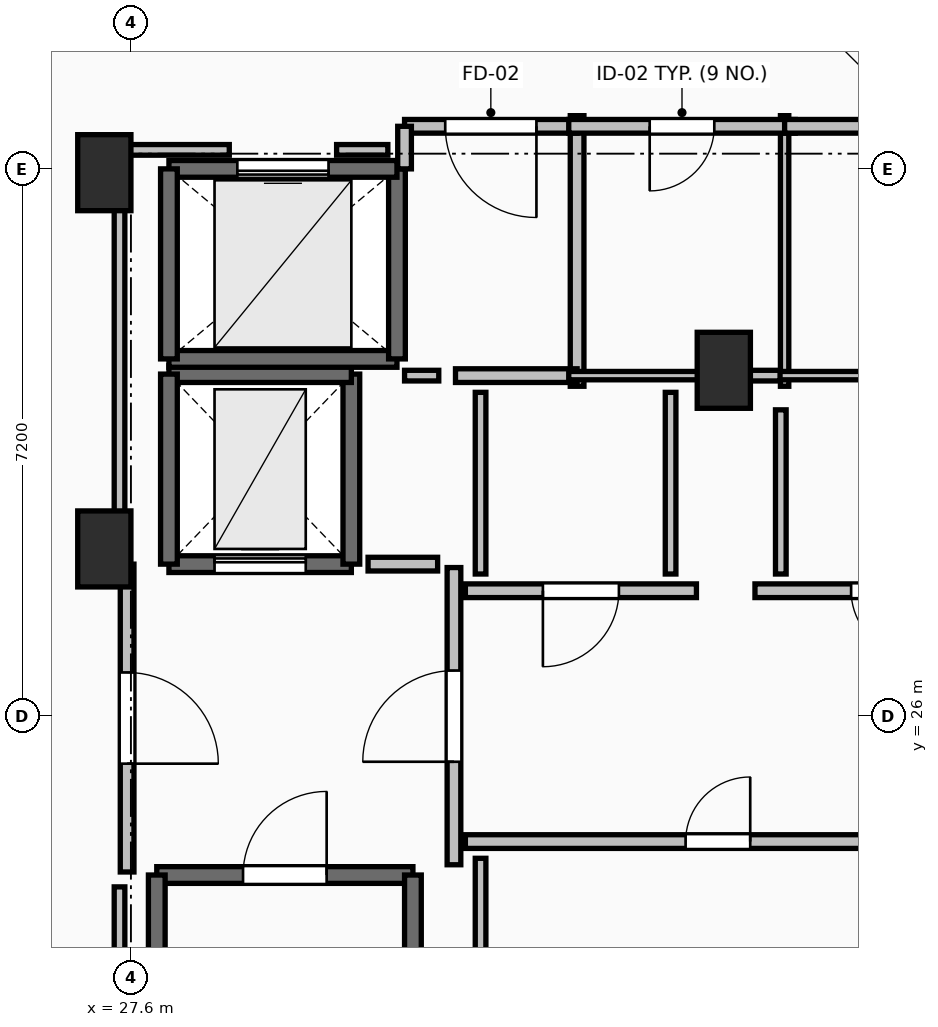
"""IFC4 building model, lengths in metres.
Left out: names, types, materials, properties, quantities, classifications, styles, units other than length and angle.
Written with IfcOpenShell. Run it as: python <this file> out.ifc"""

import sys

from ifc_helpers import new_model, si_unit, direction, frame, frame_2d, origin, origin_2d, place, context, subcontext, project, spatial, rectangle, extrude, element, fill, save


model = new_model("IFC4")
c1 = context("Model", 3, precision=1e-05, world=origin(), true_north=direction((0.0, 1.0)))
c2 = subcontext(c1, "Body", "Model", "MODEL_VIEW")
j1 = project(units=[si_unit("LENGTHUNIT", "METRE"), si_unit("PLANEANGLEUNIT", "RADIAN")], contexts=[c1])
p1 = place(None, origin())
s1 = spatial("IfcSite", under=j1, at=p1, CompositionType="ELEMENT")
p2 = place(p1, origin())
s2 = spatial("IfcBuilding", under=s1, at=p2, CompositionType="ELEMENT")
p3 = place(p2, frame((0.0, 0.0, 290.4)))
s3 = spatial("IfcBuildingStorey", under=s2, at=p3, CompositionType="ELEMENT", Elevation=290.4)
for number, where, z_axis, x_axis in (
    (1, (27.25, 28.2, 0.0), (0.0, 0.0, 1.0), (1.0, 0.0, 0.0)),
    (2, (27.25, 33.15, 0.0), (0.0, 0.0, 1.0), (1.0, 0.0, 0.0)),
    (3, (35.4, 30.55, 0.0), (0.0, 0.0, 1.0), (1.0, 0.0, 0.0)),
):
    element("IfcColumn", number, at=place(p3, frame(where, z_axis=z_axis, x_axis=x_axis)), inside=s3, PredefinedType="PILASTER", context=c2, shape_type="SweptSolid", body=[
        extrude(rectangle(XDim=0.7, YDim=1.0, at=origin_2d()), origin(), (0.0, 0.0, 1.0), 5.0),
    ])
p4 = place(p3, frame((27.94, 23.91, 0.0), z_axis=(0.0, 0.0, 1.0), x_axis=(1.0, 0.0, 0.0)))
e4 = element("IfcWall", 4, at=p4, inside=s3, PredefinedType="SOLIDWALL", context=c2, shape_type="SweptSolid", body=[
    extrude(rectangle(XDim=3.37, YDim=0.22, at=frame_2d((1.685, 0.0))), origin(), (0.0, 0.0, 1.0), 4.72),
])
p5 = place(p4, frame((1.135, 0.0, 0.0)))
e5 = element("IfcOpeningElement", 5, at=p5, cuts=e4, PredefinedType="OPENING", context=c2, shape_type="SweptSolid", body=[
    extrude(rectangle(XDim=1.1, YDim=2.15, at=frame_2d((0.55, 1.075))), frame((0.0, 0.125, 0.0), z_axis=(0.0, -1.0, 0.0), x_axis=(1.0, 0.0, 0.0)), (0.0, 0.0, 1.0), 0.25),
])
for number, where, z_axis, x_axis in (
    (6, (31.31, 23.91, 0.0), (0.0, 0.0, 1.0), (0.0, -1.0, 0.0)),
    (7, (27.94, 16.49, 0.0), (0.0, 0.0, 1.0), (0.0, 1.0, 0.0)),
):
    element("IfcWall", number, at=place(p3, frame(where, z_axis=z_axis, x_axis=x_axis)), inside=s3, PredefinedType="SOLIDWALL", context=c2, shape_type="SweptSolid", body=[
        extrude(rectangle(XDim=7.42, YDim=0.22, at=frame_2d((3.71, 0.0))), origin(), (0.0, 0.0, 1.0), 4.72),
    ])
p6 = place(p3, frame((28.1, 28.0, 0.0), z_axis=(0.0, 0.0, 1.0), x_axis=(1.0, 0.0, 0.0)))
e8 = element("IfcWall", 8, at=p6, inside=s3, PredefinedType="SHEAR", context=c2, shape_type="SweptSolid", body=[
    extrude(rectangle(XDim=2.4, YDim=0.22, at=frame_2d((1.2, 0.0))), origin(), (0.0, 0.0, 1.0), 4.72),
])
p7 = place(p6, frame((0.6, 0.0, 0.0)))
e9 = element("IfcOpeningElement", 9, at=p7, cuts=e8, PredefinedType="OPENING", context=c2, shape_type="SweptSolid", body=[
    extrude(rectangle(XDim=1.2, YDim=2.2, at=frame_2d((0.6, 1.1))), frame((0.0, 0.125, 0.0), z_axis=(0.0, -1.0, 0.0), x_axis=(1.0, 0.0, 0.0)), (0.0, 0.0, 1.0), 0.25),
])
p8 = place(p3, frame((30.5, 28.0, 0.0), z_axis=(0.0, 0.0, 1.0), x_axis=(0.0, 1.0, 0.0)))
e10 = element("IfcWall", 10, at=p8, inside=s3, PredefinedType="SHEAR", context=c2, shape_type="SweptSolid", body=[
    extrude(rectangle(XDim=2.5, YDim=0.22, at=frame_2d((1.25, 0.0))), origin(), (0.0, 0.0, 1.0), 4.72),
])
p9 = place(p3, frame((30.5, 30.5, 0.0), z_axis=(0.0, 0.0, 1.0), x_axis=(-1.0, 0.0, 0.0)))
e11 = element("IfcWall", 11, at=p9, inside=s3, PredefinedType="SHEAR", context=c2, shape_type="SweptSolid", body=[
    extrude(rectangle(XDim=2.4, YDim=0.22, at=frame_2d((1.2, 0.0))), origin(), (0.0, 0.0, 1.0), 4.72),
])
p10 = place(p3, frame((28.1, 30.5, 0.0), z_axis=(0.0, 0.0, 1.0), x_axis=(0.0, -1.0, 0.0)))
e12 = element("IfcWall", 12, at=p10, inside=s3, PredefinedType="SHEAR", context=c2, shape_type="SweptSolid", body=[
    extrude(rectangle(XDim=2.5, YDim=0.22, at=frame_2d((1.25, 0.0))), origin(), (0.0, 0.0, 1.0), 4.72),
])
p11 = place(p3, frame((28.1, 30.7, 0.0), z_axis=(0.0, 0.0, 1.0), x_axis=(1.0, 0.0, 0.0)))
e13 = element("IfcWall", 13, at=p11, inside=s3, PredefinedType="SOLIDWALL", context=c2, shape_type="SweptSolid", body=[
    extrude(rectangle(XDim=3.0, YDim=0.22, at=frame_2d((1.5, 0.0))), origin(), (0.0, 0.0, 1.0), 4.72),
])
p12 = place(p3, frame((31.1, 30.7, 0.0), z_axis=(0.0, 0.0, 1.0), x_axis=(0.0, 1.0, 0.0)))
e14 = element("IfcWall", 14, at=p12, inside=s3, PredefinedType="SOLIDWALL", context=c2, shape_type="SweptSolid", body=[
    extrude(rectangle(XDim=2.5, YDim=0.22, at=frame_2d((1.25, 0.0))), origin(), (0.0, 0.0, 1.0), 4.72),
])
p13 = place(p3, frame((31.1, 33.2, 0.0), z_axis=(0.0, 0.0, 1.0), x_axis=(-1.0, 0.0, 0.0)))
e15 = element("IfcWall", 15, at=p13, inside=s3, PredefinedType="SOLIDWALL", context=c2, shape_type="SweptSolid", body=[
    extrude(rectangle(XDim=3.0, YDim=0.22, at=frame_2d((1.5, 0.0))), origin(), (0.0, 0.0, 1.0), 4.72),
])
p14 = place(p13, frame((0.9, 0.0, 0.0)))
e16 = element("IfcOpeningElement", 16, at=p14, cuts=e15, PredefinedType="OPENING", context=c2, shape_type="SweptSolid", body=[
    extrude(rectangle(XDim=1.2, YDim=2.2, at=frame_2d((0.6, 1.1))), frame((0.0, 0.125, 0.0), z_axis=(0.0, -1.0, 0.0), x_axis=(1.0, 0.0, 0.0)), (0.0, 0.0, 1.0), 0.25),
])
p15 = place(p3, frame((28.1, 33.2, 0.0), z_axis=(0.0, 0.0, 1.0), x_axis=(0.0, -1.0, 0.0)))
e17 = element("IfcWall", 17, at=p15, inside=s3, PredefinedType="SOLIDWALL", context=c2, shape_type="SweptSolid", body=[
    extrude(rectangle(XDim=2.5, YDim=0.22, at=frame_2d((1.25, 0.0))), origin(), (0.0, 0.0, 1.0), 4.72),
])
p16 = place(p3, frame((31.85, 24.045, 0.0), z_axis=(0.0, 0.0, 1.0), x_axis=(0.0, 1.0, 0.0)))
e18 = element("IfcWall", 18, at=p16, inside=s3, PredefinedType="PARTITIONING", context=c2, shape_type="SweptSolid", body=[
    extrude(rectangle(XDim=3.91, YDim=0.18, at=frame_2d((1.955, 0.0))), origin(), (0.0, 0.0, 1.0), 4.72),
])
p17 = place(p16, frame((1.355, 0.0, 0.0)))
e19 = element("IfcOpeningElement", 19, at=p17, cuts=e18, PredefinedType="OPENING", context=c2, shape_type="SweptSolid", body=[
    extrude(rectangle(XDim=1.2, YDim=2.15, at=frame_2d((0.6, 1.075))), frame((0.0, 0.105, 0.0), z_axis=(0.0, -1.0, 0.0), x_axis=(1.0, 0.0, 0.0)), (0.0, 0.0, 1.0), 0.21),
])
p18 = place(p3, frame((27.55, 28.0, 0.0), z_axis=(0.0, 0.0, 1.0), x_axis=(0.0, -1.0, 0.0)))
e20 = element("IfcWall", 20, at=p18, inside=s3, PredefinedType="PARTITIONING", context=c2, shape_type="SweptSolid", body=[
    extrude(rectangle(XDim=4.05, YDim=0.18, at=frame_2d((2.025, 0.0))), origin(), (0.0, 0.0, 1.0), 4.72),
])
p19 = place(p18, frame((1.425, 0.0, 0.0)))
e21 = element("IfcOpeningElement", 21, at=p19, cuts=e20, PredefinedType="OPENING", context=c2, shape_type="SweptSolid", body=[
    extrude(rectangle(XDim=1.2, YDim=2.15, at=frame_2d((0.6, 1.075))), frame((0.0, 0.105, 0.0), z_axis=(0.0, -1.0, 0.0), x_axis=(1.0, 0.0, 0.0)), (0.0, 0.0, 1.0), 0.21),
])
p20 = place(p3, frame((33.47, 30.34, 0.0), z_axis=(0.0, 0.0, 1.0), x_axis=(0.0, 1.0, 0.0)))
e22 = element("IfcWall", 22, at=p20, inside=s3, PredefinedType="PARTITIONING", context=c2, shape_type="SweptSolid", body=[
    extrude(rectangle(XDim=3.56, YDim=0.18, at=frame_2d((1.78, 0.0))), origin(), (0.0, 0.0, 1.0), 4.72),
])
p21 = place(p3, frame((31.87, 30.48, 0.0), z_axis=(0.0, 0.0, 1.0), x_axis=(1.0, 0.0, 0.0)))
e23 = element("IfcWall", 23, at=p21, inside=s3, PredefinedType="PARTITIONING", context=c2, shape_type="SweptSolid", body=[
    extrude(rectangle(XDim=1.6, YDim=0.18, at=frame_2d((0.8, 0.0))), origin(), (0.0, 0.0, 1.0), 4.72),
])
p22 = place(p3, frame((33.47, 33.76, 0.0), z_axis=(0.0, 0.0, 1.0), x_axis=(-1.0, 0.0, 0.0)))
e24 = element("IfcWall", 24, at=p22, inside=s3, PredefinedType="PARTITIONING", context=c2, shape_type="SweptSolid", body=[
    extrude(rectangle(XDim=2.27, YDim=0.18, at=frame_2d((1.135, 0.0))), origin(), (0.0, 0.0, 1.0), 4.72),
])
p23 = place(p22, frame((0.535, 0.0, 0.0)))
e25 = element("IfcOpeningElement", 25, at=p23, cuts=e24, PredefinedType="OPENING", context=c2, shape_type="SweptSolid", body=[
    extrude(rectangle(XDim=1.2, YDim=2.15, at=frame_2d((0.6, 1.075))), frame((0.0, 0.105, 0.0), z_axis=(0.0, -1.0, 0.0), x_axis=(1.0, 0.0, 0.0)), (0.0, 0.0, 1.0), 0.21),
])
p24 = place(p3, frame((31.2, 33.76, 0.0), z_axis=(0.0, 0.0, 1.0), x_axis=(0.0, -1.0, 0.0)))
e26 = element("IfcWall", 26, at=p24, inside=s3, PredefinedType="PARTITIONING", context=c2, shape_type="SweptSolid", body=[
    extrude(rectangle(XDim=0.56, YDim=0.18, at=frame_2d((0.28, 0.0))), origin(), (0.0, 0.0, 1.0), 4.72),
])
p25 = place(p3, frame((35.04, 27.65, 0.0), z_axis=(0.0, 0.0, 1.0), x_axis=(-1.0, 0.0, 0.0)))
e27 = element("IfcWall", 27, at=p25, inside=s3, PredefinedType="PARTITIONING", context=c2, shape_type="SweptSolid", body=[
    extrude(rectangle(XDim=3.04, YDim=0.18, at=frame_2d((1.52, 0.0))), origin(), (0.0, 0.0, 1.0), 4.72),
])
p26 = place(p25, frame((1.02, 0.0, 0.0)))
e28 = element("IfcOpeningElement", 28, at=p26, cuts=e27, PredefinedType="OPENING", context=c2, shape_type="SweptSolid", body=[
    extrude(rectangle(XDim=1.0, YDim=2.15, at=frame_2d((0.5, 1.075))), frame((0.0, 0.105, 0.0), z_axis=(0.0, -1.0, 0.0), x_axis=(1.0, 0.0, 0.0)), (0.0, 0.0, 1.0), 0.21),
])
p27 = place(p3, frame((39.19, 27.65, 0.0), z_axis=(0.0, 0.0, 1.0), x_axis=(-1.0, 0.0, 0.0)))
e29 = element("IfcWall", 29, at=p27, inside=s3, PredefinedType="PARTITIONING", context=c2, shape_type="SweptSolid", body=[
    extrude(rectangle(XDim=3.38, YDim=0.18, at=frame_2d((1.69, 0.0))), origin(), (0.0, 0.0, 1.0), 4.72),
])
p28 = place(p27, frame((1.265, 0.0, 0.0)))
e30 = element("IfcOpeningElement", 30, at=p28, cuts=e29, PredefinedType="OPENING", context=c2, shape_type="SweptSolid", body=[
    extrude(rectangle(XDim=0.85, YDim=2.1, at=frame_2d((0.425, 1.05))), frame((0.0, 0.105, 0.0), z_axis=(0.0, -1.0, 0.0), x_axis=(1.0, 0.0, 0.0)), (0.0, 0.0, 1.0), 0.21),
])
p29 = place(p3, frame((32.0, 24.35, 0.0), z_axis=(0.0, 0.0, 1.0), x_axis=(1.0, 0.0, 0.0)))
e31 = element("IfcWall", 31, at=p29, inside=s3, PredefinedType="PARTITIONING", context=c2, shape_type="SweptSolid", body=[
    extrude(rectangle(XDim=6.645, YDim=0.18, at=frame_2d((3.323, 0.0))), origin(), (0.0, 0.0, 1.0), 4.72),
])
p30 = place(p29, frame((2.897, 0.0, 0.0)))
e32 = element("IfcOpeningElement", 32, at=p30, cuts=e31, PredefinedType="OPENING", context=c2, shape_type="SweptSolid", body=[
    extrude(rectangle(XDim=0.85, YDim=2.1, at=frame_2d((0.425, 1.05))), frame((0.0, 0.105, 0.0), z_axis=(0.0, -1.0, 0.0), x_axis=(1.0, 0.0, 0.0)), (0.0, 0.0, 1.0), 0.21),
])
p31 = place(p3, frame((36.2, 30.34, 0.0), z_axis=(0.0, 0.0, 1.0), x_axis=(0.0, 1.0, 0.0)))
e33 = element("IfcWall", 33, at=p31, inside=s3, PredefinedType="PARTITIONING", context=c2, shape_type="SweptSolid", body=[
    extrude(rectangle(XDim=3.56, YDim=0.11, at=frame_2d((1.78, 0.0))), origin(), (0.0, 0.0, 1.0), 3.912),
])
p32 = place(p3, frame((33.36, 30.48, 0.0), z_axis=(0.0, 0.0, 1.0), x_axis=(1.0, 0.0, 0.0)))
e34 = element("IfcWall", 34, at=p32, inside=s3, PredefinedType="PARTITIONING", context=c2, shape_type="SweptSolid", body=[
    extrude(rectangle(XDim=1.81, YDim=0.11, at=frame_2d((0.905, 0.0))), origin(), (0.0, 0.0, 1.0), 4.72),
])
p33 = place(p3, frame((36.34, 33.76, 0.0), z_axis=(0.0, 0.0, 1.0), x_axis=(-1.0, 0.0, 0.0)))
e35 = element("IfcWall", 35, at=p33, inside=s3, PredefinedType="PARTITIONING", context=c2, shape_type="SweptSolid", body=[
    extrude(rectangle(XDim=2.98, YDim=0.18, at=frame_2d((1.49, 0.0))), origin(), (0.0, 0.0, 1.0), 4.72),
])
p34 = place(p33, frame((1.065, 0.0, 0.0)))
e36 = element("IfcOpeningElement", 36, at=p34, cuts=e35, PredefinedType="OPENING", context=c2, shape_type="SweptSolid", body=[
    extrude(rectangle(XDim=0.85, YDim=2.1, at=frame_2d((0.425, 1.05))), frame((0.0, 0.105, 0.0), z_axis=(0.0, -1.0, 0.0), x_axis=(1.0, 0.0, 0.0)), (0.0, 0.0, 1.0), 0.21),
])
p35 = place(p3, frame((36.11, 30.48, 0.0), z_axis=(0.0, 0.0, 1.0), x_axis=(1.0, 0.0, 0.0)))
e37 = element("IfcWall", 37, at=p35, inside=s3, PredefinedType="PARTITIONING", context=c2, shape_type="SweptSolid", body=[
    extrude(rectangle(XDim=3.21, YDim=0.11, at=frame_2d((1.605, 0.0))), origin(), (0.0, 0.0, 1.0), 3.912),
])
p36 = place(p3, frame((41.04, 33.76, 0.0), z_axis=(0.0, 0.0, 1.0), x_axis=(-1.0, 0.0, 0.0)))
e38 = element("IfcWall", 38, at=p36, inside=s3, PredefinedType="PARTITIONING", context=c2, shape_type="SweptSolid", body=[
    extrude(rectangle(XDim=4.84, YDim=0.18, at=frame_2d((2.42, 0.0))), origin(), (0.0, 0.0, 1.0), 4.72),
])
p37 = place(p36, frame((1.995, 0.0, 0.0)))
e39 = element("IfcOpeningElement", 39, at=p37, cuts=e38, PredefinedType="OPENING", context=c2, shape_type="SweptSolid", body=[
    extrude(rectangle(XDim=0.85, YDim=2.1, at=frame_2d((0.425, 1.05))), frame((0.0, 0.105, 0.0), z_axis=(0.0, -1.0, 0.0), x_axis=(1.0, 0.0, 0.0)), (0.0, 0.0, 1.0), 0.21),
])
p38 = place(p3, frame((31.635, 28.0, 0.0), z_axis=(0.0, 0.0, 1.0), x_axis=(-1.0, 0.0, 0.0)))
e40 = element("IfcWall", 40, at=p38, inside=s3, PredefinedType="PARTITIONING", context=c2, shape_type="SweptSolid", body=[
    extrude(rectangle(XDim=0.915, YDim=0.18, at=frame_2d((0.458, 0.0))), origin(), (0.0, 0.0, 1.0), 4.72),
])
p39 = place(p3, frame((31.2, 30.48, 0.0), z_axis=(0.0, 0.0, 1.0), x_axis=(1.0, 0.0, 0.0)))
e41 = element("IfcWall", 41, at=p39, inside=s3, PredefinedType="PARTITIONING", context=c2, shape_type="SweptSolid", body=[
    extrude(rectangle(XDim=0.45, YDim=0.14, at=frame_2d((0.225, 0.0))), origin(), (0.0, 0.0, 1.0), 4.72),
])
p40 = place(p3, frame((35.14, 30.48, 0.0), z_axis=(0.0, 0.0, 1.0), x_axis=(1.0, 0.0, 0.0)))
e42 = element("IfcWall", 42, at=p40, inside=s3, PredefinedType="PARTITIONING", context=c2, shape_type="SweptSolid", body=[
    extrude(rectangle(XDim=1.0, YDim=0.14, at=frame_2d((0.5, 0.0))), origin(), (0.0, 0.0, 1.0), 3.912),
])
for number, where, z_axis, x_axis in (
    (43, (32.2, 30.26, 0.0), (0.0, 0.0, 1.0), (0.0, -1.0, 0.0)),
    (44, (34.7, 27.87, 0.0), (0.0, 0.0, 1.0), (0.0, 1.0, 0.0)),
):
    element("IfcWall", number, at=place(p3, frame(where, z_axis=z_axis, x_axis=x_axis)), inside=s3, PredefinedType="PARTITIONING", context=c2, shape_type="SweptSolid", body=[
        extrude(rectangle(XDim=2.39, YDim=0.14, at=frame_2d((1.195, 0.0))), origin(), (0.0, 0.0, 1.0), 4.72),
    ])
p41 = place(p3, frame((36.15, 30.03, 0.0), z_axis=(0.0, 0.0, 1.0), x_axis=(0.0, -1.0, 0.0)))
e45 = element("IfcWall", 45, at=p41, inside=s3, PredefinedType="PARTITIONING", context=c2, shape_type="SweptSolid", body=[
    extrude(rectangle(XDim=2.16, YDim=0.14, at=frame_2d((1.08, 0.0))), origin(), (0.0, 0.0, 1.0), 4.72),
])
p42 = place(p3, frame((32.2, 24.13, 0.0), z_axis=(0.0, 0.0, 1.0), x_axis=(0.0, -1.0, 0.0)))
e46 = element("IfcWall", 46, at=p42, inside=s3, PredefinedType="PARTITIONING", context=c2, shape_type="SweptSolid", body=[
    extrude(rectangle(XDim=2.46, YDim=0.14, at=frame_2d((1.23, 0.0))), origin(), (0.0, 0.0, 1.0), 3.912),
])
p43 = place(p3, frame((30.98, 33.45, 0.0), z_axis=(0.0, 0.0, 1.0), x_axis=(-1.0, 0.0, 0.0)))
e47 = element("IfcWall", 47, at=p43, inside=s3, PredefinedType="PARTITIONING", context=c2, shape_type="SweptSolid", body=[
    extrude(rectangle(XDim=0.674, YDim=0.14, at=frame_2d((0.337, 0.0))), origin(), (0.0, 0.0, 1.0), 4.72),
])
p44 = place(p3, frame((28.894, 33.45, 0.0), z_axis=(0.0, 0.0, 1.0), x_axis=(-1.0, 0.0, 0.0)))
e48 = element("IfcWall", 48, at=p44, inside=s3, PredefinedType="PARTITIONING", context=c2, shape_type="SweptSolid", body=[
    extrude(rectangle(XDim=1.444, YDim=0.14, at=frame_2d((0.722, 0.0))), origin(), (0.0, 0.0, 1.0), 3.912),
])
p45 = place(p3, frame((27.45, 33.45, 0.0), z_axis=(0.0, 0.0, 1.0), x_axis=(0.0, -1.0, 0.0)))
e49 = element("IfcWall", 49, at=p45, inside=s3, PredefinedType="PARTITIONING", context=c2, shape_type="SweptSolid", body=[
    extrude(rectangle(XDim=5.254, YDim=0.14, at=frame_2d((2.627, 0.0))), origin(), (0.0, 0.0, 1.0), 3.912),
])
p46 = place(p3, frame((27.45, 23.754, 0.0), z_axis=(0.0, 0.0, 1.0), x_axis=(0.0, -1.0, 0.0)))
e50 = element("IfcWall", 50, at=p46, inside=s3, PredefinedType="PARTITIONING", context=c2, shape_type="SweptSolid", body=[
    extrude(rectangle(XDim=7.514, YDim=0.14, at=frame_2d((3.757, 0.0))), origin(), (0.0, 0.0, 1.0), 3.912),
])
p47 = place(p5, origin())
e51 = element("IfcDoor", 51, at=p47, inside=s3, OperationType="SINGLE_SWING_RIGHT", PredefinedType="DOOR", context=c2, shape_type="SweptSolid", body=[
    extrude(rectangle(XDim=1.1, YDim=2.15, at=frame_2d((0.55, 1.075))), frame((0.0, 0.025, 0.0), z_axis=(0.0, -1.0, 0.0), x_axis=(1.0, 0.0, 0.0)), (0.0, 0.0, 1.0), 0.05),
])
fill(e5, e51)
p48 = place(p7, origin())
e52 = element("IfcDoor", 52, at=p48, inside=s3, OperationType="SLIDING_TO_LEFT", PredefinedType="DOOR", context=c2, shape_type="SweptSolid", body=[
    extrude(rectangle(XDim=1.2, YDim=2.2, at=frame_2d((0.6, 1.1))), frame((0.0, 0.025, 0.0), z_axis=(0.0, -1.0, 0.0), x_axis=(1.0, 0.0, 0.0)), (0.0, 0.0, 1.0), 0.05),
])
fill(e9, e52)
p49 = place(p14, origin())
e53 = element("IfcDoor", 53, at=p49, inside=s3, OperationType="SLIDING_TO_LEFT", PredefinedType="DOOR", context=c2, shape_type="SweptSolid", body=[
    extrude(rectangle(XDim=1.2, YDim=2.2, at=frame_2d((0.6, 1.1))), frame((0.0, 0.025, 0.0), z_axis=(0.0, -1.0, 0.0), x_axis=(1.0, 0.0, 0.0)), (0.0, 0.0, 1.0), 0.05),
])
fill(e16, e53)
p50 = place(p17, origin())
e54 = element("IfcDoor", 54, at=p50, inside=s3, OperationType="SINGLE_SWING_LEFT", PredefinedType="DOOR", context=c2, shape_type="SweptSolid", body=[
    extrude(rectangle(XDim=1.2, YDim=2.15, at=frame_2d((0.6, 1.075))), frame((0.0, 0.025, 0.0), z_axis=(0.0, -1.0, 0.0), x_axis=(1.0, 0.0, 0.0)), (0.0, 0.0, 1.0), 0.05),
])
fill(e19, e54)
p51 = place(p19, origin())
e55 = element("IfcDoor", 55, at=p51, inside=s3, OperationType="SINGLE_SWING_RIGHT", PredefinedType="DOOR", context=c2, shape_type="SweptSolid", body=[
    extrude(rectangle(XDim=1.2, YDim=2.15, at=frame_2d((0.6, 1.075))), frame((0.0, 0.025, 0.0), z_axis=(0.0, -1.0, 0.0), x_axis=(1.0, 0.0, 0.0)), (0.0, 0.0, 1.0), 0.05),
])
fill(e21, e55)
p52 = place(p23, origin())
e56 = element("IfcDoor", 56, at=p52, inside=s3, OperationType="SINGLE_SWING_LEFT", PredefinedType="DOOR", context=c2, shape_type="SweptSolid", body=[
    extrude(rectangle(XDim=1.2, YDim=2.15, at=frame_2d((0.6, 1.075))), frame((0.0, 0.025, 0.0), z_axis=(0.0, -1.0, 0.0), x_axis=(1.0, 0.0, 0.0)), (0.0, 0.0, 1.0), 0.05),
])
fill(e25, e56)
p53 = place(p26, origin())
e57 = element("IfcDoor", 57, at=p53, inside=s3, OperationType="SINGLE_SWING_RIGHT", PredefinedType="DOOR", context=c2, shape_type="SweptSolid", body=[
    extrude(rectangle(XDim=1.0, YDim=2.15, at=frame_2d((0.5, 1.075))), frame((0.0, 0.025, 0.0), z_axis=(0.0, -1.0, 0.0), x_axis=(1.0, 0.0, 0.0)), (0.0, 0.0, 1.0), 0.05),
])
fill(e28, e57)
p54 = place(p28, origin())
e58 = element("IfcDoor", 58, at=p54, inside=s3, OperationType="SINGLE_SWING_LEFT", PredefinedType="DOOR", context=c2, shape_type="SweptSolid", body=[
    extrude(rectangle(XDim=0.85, YDim=2.1, at=frame_2d((0.425, 1.05))), frame((0.0, 0.025, 0.0), z_axis=(0.0, -1.0, 0.0), x_axis=(1.0, 0.0, 0.0)), (0.0, 0.0, 1.0), 0.05),
])
fill(e30, e58)
p55 = place(p30, origin())
e59 = element("IfcDoor", 59, at=p55, inside=s3, OperationType="SINGLE_SWING_RIGHT", PredefinedType="DOOR", context=c2, shape_type="SweptSolid", body=[
    extrude(rectangle(XDim=0.85, YDim=2.1, at=frame_2d((0.425, 1.05))), frame((0.0, 0.025, 0.0), z_axis=(0.0, -1.0, 0.0), x_axis=(1.0, 0.0, 0.0)), (0.0, 0.0, 1.0), 0.05),
])
fill(e32, e59)
p56 = place(p34, origin())
e60 = element("IfcDoor", 60, at=p56, inside=s3, OperationType="SINGLE_SWING_RIGHT", PredefinedType="DOOR", context=c2, shape_type="SweptSolid", body=[
    extrude(rectangle(XDim=0.85, YDim=2.1, at=frame_2d((0.425, 1.05))), frame((0.0, 0.025, 0.0), z_axis=(0.0, -1.0, 0.0), x_axis=(1.0, 0.0, 0.0)), (0.0, 0.0, 1.0), 0.05),
])
fill(e36, e60)
save(model, sys.argv[1])
